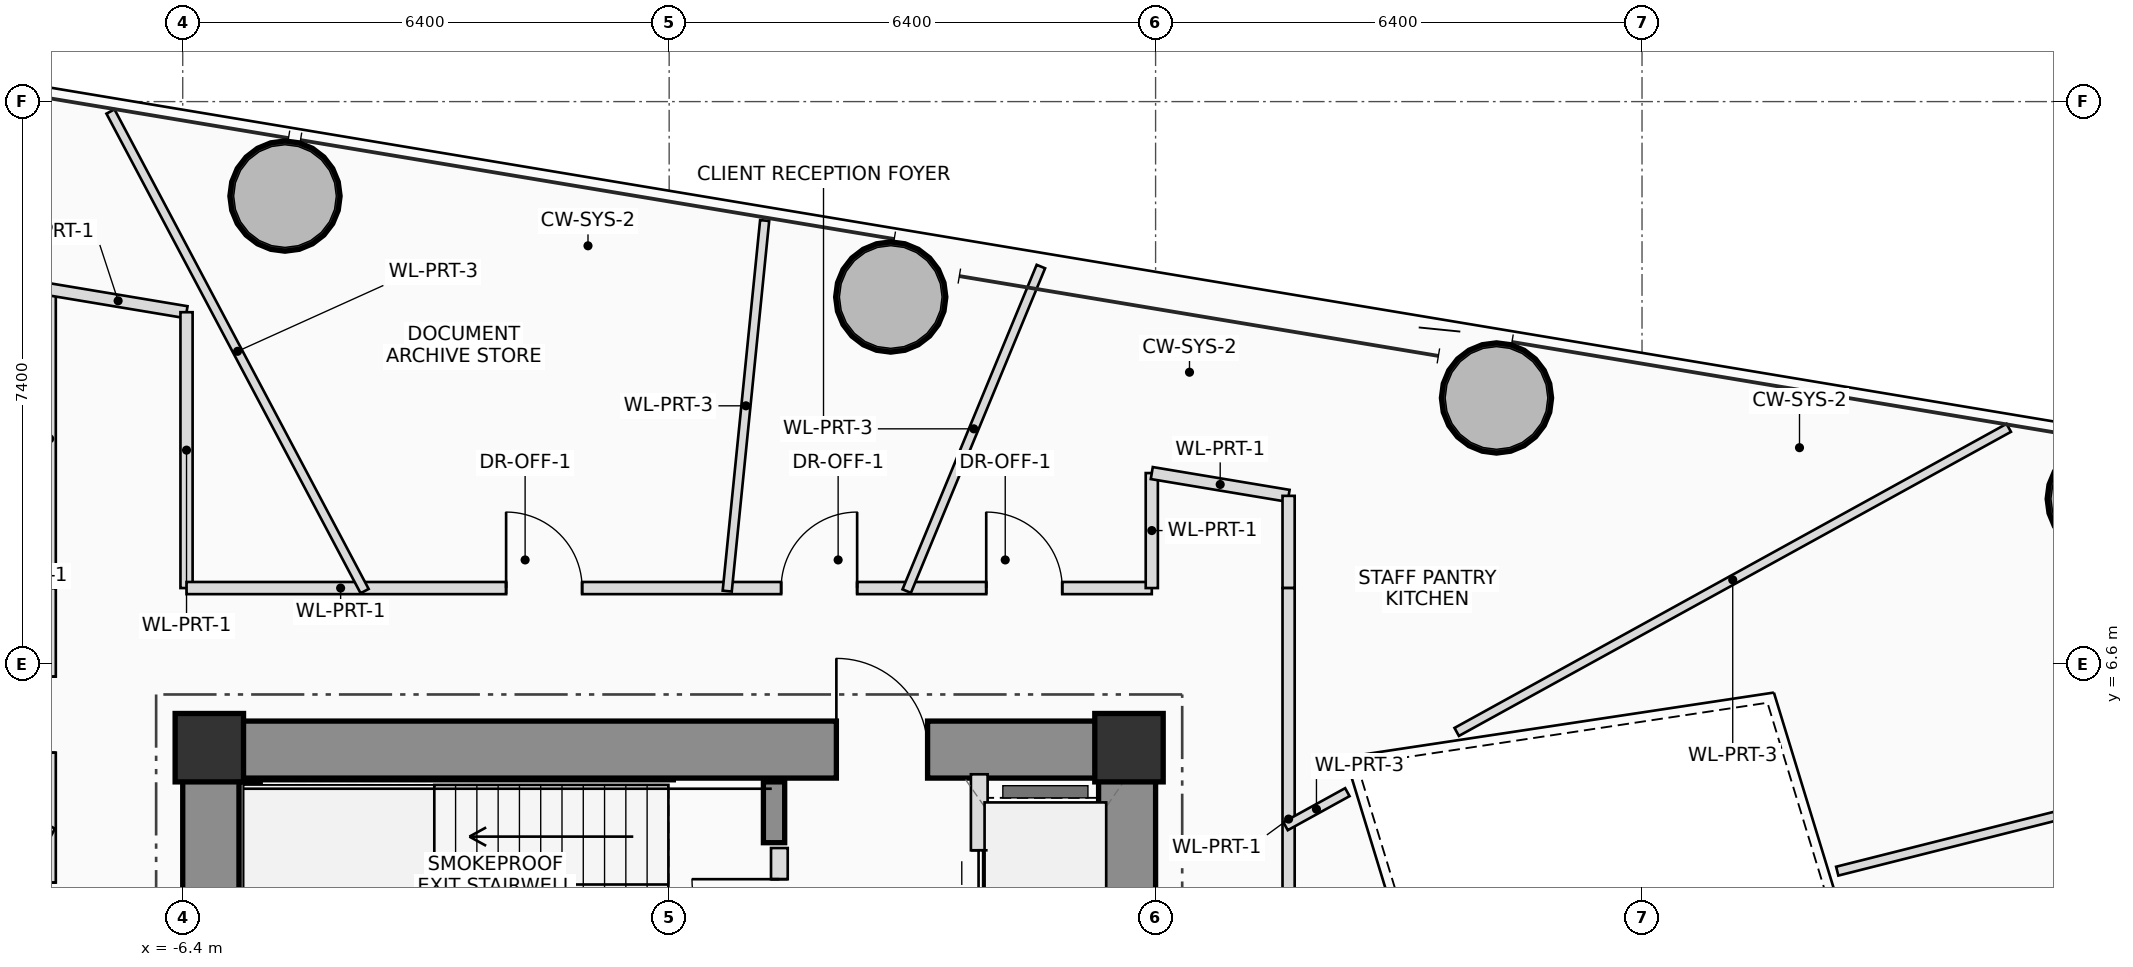
"""IFC4 building model, lengths in metres.
Left out: names, types, materials, properties, quantities, classifications, styles, units other than length and angle.
Written with IfcOpenShell. Run it as: python <this file> out.ifc"""

import sys

from ifc_helpers import new_model, si_unit, direction, frame, frame_2d, origin, origin_2d, place, context, subcontext, project, spatial, rectangle, hollow_circle, extrude, source, transform, mapped, element, fill, save


model = new_model("IFC4")
c1 = context("Model", 3, precision=1e-05, world=origin(), true_north=direction((0.0, 1.0)))
c2 = subcontext(c1, "Body", "Model", "MODEL_VIEW")
j1 = project(units=[si_unit("LENGTHUNIT", "METRE"), si_unit("PLANEANGLEUNIT", "RADIAN")], contexts=[c1])
p1 = place(None, origin())
s1 = spatial("IfcSite", under=j1, at=p1, CompositionType="ELEMENT")
p2 = place(p1, origin())
s2 = spatial("IfcBuilding", under=s1, at=p2, CompositionType="ELEMENT")
p3 = place(p2, frame((0.0, 0.0, 112.4)))
s3 = spatial("IfcBuildingStorey", under=s2, at=p3, CompositionType="ELEMENT", Elevation=112.4)
m1 = source(origin(), c2, "Body", "SweptSolid", [
    extrude(rectangle(XDim=0.9, YDim=0.9, at=origin_2d()), origin(), (0.0, 0.0, 1.0), 3.75),
])
for number, where, z_axis, x_axis in (
    (1, (6.05, 5.5, 0.0), (0.0, 0.0, 1.0), (1.0, 0.0, 0.0)),
    (2, (-6.05, 5.5, 0.0), (0.0, 0.0, 1.0), (1.0, 0.0, 0.0)),
):
    element("IfcColumn", number, at=place(p3, frame(where, z_axis=z_axis, x_axis=x_axis)), inside=s3, PredefinedType="COLUMN", context=c2, shape_type="MappedRepresentation", body=[
        mapped(m1, transform((0.0, 0.0, 0.0), scale=1.0)),
    ])
p4 = place(p3, frame((-6.4, 5.475, 0.0), z_axis=(0.0, 0.0, 1.0), x_axis=(1.0, 0.0, 0.0)))
e3 = element("IfcWall", 3, at=p4, inside=s3, PredefinedType="SHEAR", context=c2, shape_type="SweptSolid", body=[
    extrude(rectangle(XDim=12.8, YDim=0.75, at=frame_2d((6.4, 0.0))), origin(), (0.0, 0.0, 1.0), 3.75),
])
p5 = place(p4, frame((8.6, 0.0, 0.0)))
e4 = element("IfcOpeningElement", 4, at=p5, cuts=e3, PredefinedType="OPENING", context=c2, shape_type="SweptSolid", body=[
    extrude(rectangle(XDim=1.2, YDim=2.2, at=frame_2d((0.6, 1.1))), frame((0.0, 0.385, 0.0), z_axis=(0.0, -1.0, 0.0), x_axis=(1.0, 0.0, 0.0)), (0.0, 0.0, 1.0), 0.77),
])
p6 = place(p3, frame((6.025, -5.1, 0.0), z_axis=(0.0, 0.0, 1.0), x_axis=(0.0, 1.0, 0.0)))
e5 = element("IfcWall", 5, at=p6, inside=s3, PredefinedType="SHEAR", context=c2, shape_type="SweptSolid", body=[
    extrude(rectangle(XDim=10.2, YDim=0.75, at=frame_2d((5.1, 0.0))), origin(), (0.0, 0.0, 1.0), 3.75),
])
p7 = place(p3, frame((-6.025, 1.75, 0.0), z_axis=(0.0, 0.0, 1.0), x_axis=(0.0, 1.0, 0.0)))
e6 = element("IfcWall", 6, at=p7, inside=s3, PredefinedType="SHEAR", context=c2, shape_type="SweptSolid", body=[
    extrude(rectangle(XDim=3.35, YDim=0.75, at=frame_2d((1.675, 0.0))), origin(), (0.0, 0.0, 1.0), 3.75),
])
p8 = place(p3, frame((-5.52, 2.3, 0.0), z_axis=(0.0, 0.0, 1.0), x_axis=(0.0, 1.0, 0.0)))
e7 = element("IfcWall", 7, at=p8, inside=s3, PredefinedType="SHEAR", context=c2, shape_type="SweptSolid", body=[
    extrude(rectangle(XDim=2.75, YDim=0.28, at=frame_2d((1.375, 0.0))), origin(), (0.0, 0.0, 1.0), 3.75),
])
p9 = place(p3, frame((1.38, 4.25, 0.0), z_axis=(0.0, 0.0, 1.0), x_axis=(0.0, 1.0, 0.0)))
e8 = element("IfcWall", 8, at=p9, inside=s3, PredefinedType="SHEAR", context=c2, shape_type="SweptSolid", body=[
    extrude(rectangle(XDim=0.8, YDim=0.28, at=frame_2d((0.4, 0.0))), origin(), (0.0, 0.0, 1.0), 3.75),
])
m2 = source(origin(), c2, "Body", "SweptSolid", [
    extrude(hollow_circle(Radius=0.725, WallThickness=0.05, at=origin_2d()), origin(), (0.0, 0.0, 1.0), 3.75),
])
for number, where, z_axis, x_axis in (
    (9, (18.855, 8.773, 0.0), (0.0, 0.0, 1.0), (1.0, 0.0, 0.0)),
    (10, (10.885, 10.101, 0.0), (0.0, 0.0, 1.0), (1.0, 0.0, 0.0)),
    (11, (2.915, 11.429, 0.0), (0.0, 0.0, 1.0), (1.0, 0.0, 0.0)),
    (12, (-5.054, 12.757, 0.0), (0.0, 0.0, 1.0), (1.0, 0.0, 0.0)),
):
    element("IfcColumn", number, at=place(p3, frame(where, z_axis=z_axis, x_axis=x_axis)), inside=s3, PredefinedType="COLUMN", context=c2, shape_type="MappedRepresentation", body=[
        mapped(m2, transform((0.0, 0.0, 0.0), scale=1.0)),
    ])
p10 = place(p3, frame((1.45, 2.2, 0.0), z_axis=(0.0, 0.0, 1.0), x_axis=(0.0, 1.0, 0.0)))
e13 = element("IfcWall", 13, at=p10, inside=s3, PredefinedType="PLUMBINGWALL", context=c2, shape_type="SweptSolid", body=[
    extrude(rectangle(XDim=1.98, YDim=0.22, at=frame_2d((0.99, 0.0))), origin(), (0.0, 0.0, 1.0), 3.545),
])
p11 = place(p10, frame((0.42, 0.0, 0.0)))
e14 = element("IfcOpeningElement", 14, at=p11, cuts=e13, PredefinedType="OPENING", context=c2, shape_type="SweptSolid", body=[
    extrude(rectangle(XDim=1.15, YDim=2.15, at=frame_2d((0.575, 1.075))), frame((0.0, 0.12, 0.0), z_axis=(0.0, -1.0, 0.0), x_axis=(1.0, 0.0, 0.0)), (0.0, 0.0, 1.0), 0.24),
])
p12 = place(p3, frame((4.08, 2.2, 0.0), z_axis=(0.0, 0.0, 1.0), x_axis=(0.0, 1.0, 0.0)))
e15 = element("IfcWall", 15, at=p12, inside=s3, PredefinedType="PLUMBINGWALL", context=c2, shape_type="SweptSolid", body=[
    extrude(rectangle(XDim=2.95, YDim=0.22, at=frame_2d((1.475, 0.0))), origin(), (0.0, 0.0, 1.0), 3.545),
])
p13 = place(p12, frame((0.75, 0.0, 0.0)))
e16 = element("IfcOpeningElement", 16, at=p13, cuts=e15, PredefinedType="OPENING", context=c2, shape_type="SweptSolid", body=[
    extrude(rectangle(XDim=1.2, YDim=2.25, at=frame_2d((0.6, 1.125))), frame((0.0, 0.12, 0.0), z_axis=(0.0, -1.0, 0.0), x_axis=(1.0, 0.0, 0.0)), (0.0, 0.0, 1.0), 0.24),
])
p14 = place(p3, frame((-8.15, -7.6, 0.0), z_axis=(0.0, 0.0, 1.0), x_axis=(0.0, 1.0, 0.0)))
e17 = element("IfcWall", 17, at=p14, inside=s3, PredefinedType="PARTITIONING", context=c2, shape_type="SweptSolid", body=[
    extrude(rectangle(XDim=15.2, YDim=0.16, at=frame_2d((7.6, 0.0))), origin(), (0.0, 0.0, 1.0), 2.85),
])
p15 = place(p14, frame((2.29, 0.0, 0.0)))
e18 = element("IfcOpeningElement", 18, at=p15, cuts=e17, PredefinedType="OPENING", context=c2, shape_type="SweptSolid", body=[
    extrude(rectangle(XDim=1.0, YDim=2.25, at=frame_2d((0.5, 1.125))), frame((0.0, 0.09, 0.0), z_axis=(0.0, -1.0, 0.0), x_axis=(1.0, 0.0, 0.0)), (0.0, 0.0, 1.0), 0.18),
])
p16 = place(p14, frame((7.0, 0.0, 0.0)))
e19 = element("IfcOpeningElement", 19, at=p16, cuts=e17, PredefinedType="OPENING", context=c2, shape_type="SweptSolid", body=[
    extrude(rectangle(XDim=1.0, YDim=2.25, at=frame_2d((0.5, 1.125))), frame((0.0, 0.09, 0.0), z_axis=(0.0, -1.0, 0.0), x_axis=(1.0, 0.0, 0.0)), (0.0, 0.0, 1.0), 0.18),
])
p17 = place(p14, frame((10.325, 0.0, 0.0)))
e20 = element("IfcOpeningElement", 20, at=p17, cuts=e17, PredefinedType="OPENING", context=c2, shape_type="SweptSolid", body=[
    extrude(rectangle(XDim=1.0, YDim=2.25, at=frame_2d((0.5, 1.125))), frame((0.0, 0.09, 0.0), z_axis=(0.0, -1.0, 0.0), x_axis=(1.0, 0.0, 0.0)), (0.0, 0.0, 1.0), 0.18),
])
p18 = place(p14, frame((13.035, 0.0, 0.0)))
e21 = element("IfcOpeningElement", 21, at=p18, cuts=e17, PredefinedType="OPENING", context=c2, shape_type="SweptSolid", body=[
    extrude(rectangle(XDim=1.0, YDim=2.25, at=frame_2d((0.5, 1.125))), frame((0.0, 0.09, 0.0), z_axis=(0.0, -1.0, 0.0), x_axis=(1.0, 0.0, 0.0)), (0.0, 0.0, 1.0), 0.18),
])
p19 = place(p3, frame((-8.15, 7.6, 0.0), z_axis=(0.0, 0.0, 1.0), x_axis=(0.0, 1.0, 0.0)))
e22 = element("IfcWall", 22, at=p19, inside=s3, PredefinedType="PARTITIONING", context=c2, shape_type="SweptSolid", body=[
    extrude(rectangle(XDim=3.929, YDim=0.16, at=frame_2d((1.964, 0.0))), origin(), (0.0, 0.0, 1.0), 2.85),
])
p20 = place(p3, frame((-8.15, 11.529, 0.0), z_axis=(0.0, 0.0, 1.0), x_axis=(0.986408385389, -0.164312194419, 0.0)))
e23 = element("IfcWall", 23, at=p20, inside=s3, PredefinedType="PARTITIONING", context=c2, shape_type="SweptSolid", body=[
    extrude(rectangle(XDim=1.825, YDim=0.16, at=frame_2d((0.912, 0.0))), origin(), (0.0, 0.0, 1.0), 3.545),
])
p21 = place(p3, frame((-6.35, 11.229, 0.0), z_axis=(0.0, 0.0, 1.0), x_axis=(0.0, -1.0, 0.0)))
e24 = element("IfcWall", 24, at=p21, inside=s3, PredefinedType="PARTITIONING", context=c2, shape_type="SweptSolid", body=[
    extrude(rectangle(XDim=3.629, YDim=0.16, at=frame_2d((1.814, 0.0))), origin(), (0.0, 0.0, 1.0), 3.05),
])
p22 = place(p3, frame((-6.35, 7.6, 0.0), z_axis=(0.0, 0.0, 1.0), x_axis=(1.0, 0.0, 0.0)))
e25 = element("IfcWall", 25, at=p22, inside=s3, PredefinedType="PARTITIONING", context=c2, shape_type="SweptSolid", body=[
    extrude(rectangle(XDim=12.7, YDim=0.16, at=frame_2d((6.35, 0.0))), origin(), (0.0, 0.0, 1.0), 2.85),
])
p23 = place(p22, frame((4.205, 0.0, 0.0)))
e26 = element("IfcOpeningElement", 26, at=p23, cuts=e25, PredefinedType="OPENING", context=c2, shape_type="SweptSolid", body=[
    extrude(rectangle(XDim=1.0, YDim=2.25, at=frame_2d((0.5, 1.125))), frame((0.0, 0.09, 0.0), z_axis=(0.0, -1.0, 0.0), x_axis=(1.0, 0.0, 0.0)), (0.0, 0.0, 1.0), 0.18),
])
p24 = place(p22, frame((7.823, 0.0, 0.0)))
e27 = element("IfcOpeningElement", 27, at=p24, cuts=e25, PredefinedType="OPENING", context=c2, shape_type="SweptSolid", body=[
    extrude(rectangle(XDim=1.0, YDim=2.25, at=frame_2d((0.5, 1.125))), frame((0.0, 0.09, 0.0), z_axis=(0.0, -1.0, 0.0), x_axis=(1.0, 0.0, 0.0)), (0.0, 0.0, 1.0), 0.18),
])
p25 = place(p22, frame((10.522, 0.0, 0.0)))
e28 = element("IfcOpeningElement", 28, at=p25, cuts=e25, PredefinedType="OPENING", context=c2, shape_type="SweptSolid", body=[
    extrude(rectangle(XDim=1.0, YDim=2.25, at=frame_2d((0.5, 1.125))), frame((0.0, 0.09, 0.0), z_axis=(0.0, -1.0, 0.0), x_axis=(1.0, 0.0, 0.0)), (0.0, 0.0, 1.0), 0.18),
])
p26 = place(p3, frame((6.35, 7.6, 0.0), z_axis=(0.0, 0.0, 1.0), x_axis=(0.0, 1.0, 0.0)))
e29 = element("IfcWall", 29, at=p26, inside=s3, PredefinedType="PARTITIONING", context=c2, shape_type="SweptSolid", body=[
    extrude(rectangle(XDim=1.513, YDim=0.16, at=frame_2d((0.756, 0.0))), origin(), (0.0, 0.0, 1.0), 3.05),
])
p27 = place(p3, frame((6.35, 9.113, 0.0), z_axis=(0.0, 0.0, 1.0), x_axis=(0.986386690349, -0.164442382317, 0.0)))
e30 = element("IfcWall", 30, at=p27, inside=s3, PredefinedType="PARTITIONING", context=c2, shape_type="SweptSolid", body=[
    extrude(rectangle(XDim=1.825, YDim=0.16, at=frame_2d((0.912, 0.0))), origin(), (0.0, 0.0, 1.0), 3.2),
])
p28 = place(p3, frame((8.15, 8.813, 0.0), z_axis=(0.0, 0.0, 1.0), x_axis=(0.0, -1.0, 0.0)))
e31 = element("IfcWall", 31, at=p28, inside=s3, PredefinedType="PARTITIONING", context=c2, shape_type="SweptSolid", body=[
    extrude(rectangle(XDim=1.213, YDim=0.16, at=frame_2d((0.606, 0.0))), origin(), (0.0, 0.0, 1.0), 2.85),
])
p29 = place(p3, frame((8.15, 7.6, 0.0), z_axis=(0.0, 0.0, 1.0), x_axis=(0.0, -1.0, 0.0)))
e32 = element("IfcWall", 32, at=p29, inside=s3, PredefinedType="PARTITIONING", context=c2, shape_type="SweptSolid", body=[
    extrude(rectangle(XDim=7.58, YDim=0.16, at=frame_2d((3.79, 0.0))), origin(), (0.0, 0.0, 1.0), 2.85),
])
p30 = place(p29, frame((6.229, 0.0, 0.0)))
e33 = element("IfcOpeningElement", 33, at=p30, cuts=e32, PredefinedType="OPENING", context=c2, shape_type="SweptSolid", body=[
    extrude(rectangle(XDim=1.0, YDim=2.25, at=frame_2d((0.5, 1.125))), frame((0.0, 0.09, 0.0), z_axis=(0.0, -1.0, 0.0), x_axis=(1.0, 0.0, 0.0)), (0.0, 0.0, 1.0), 0.18),
])
p31 = place(p3, frame((15.368, 3.875, 0.0), z_axis=(0.0, 0.0, 1.0), x_axis=(0.969639714565, 0.244537980563, 0.0)))
e34 = element("IfcWall", 34, at=p31, inside=s3, PredefinedType="PARTITIONING", context=c2, shape_type="SweptSolid", body=[
    extrude(rectangle(XDim=8.117, YDim=0.12, at=frame_2d((4.058, 0.0))), origin(), (0.0, 0.0, 1.0), 3.01),
])
p32 = place(p3, frame((8.11, 4.467, 0.0), z_axis=(0.0, 0.0, 1.0), x_axis=(0.875876836962, 0.482534730847, 0.0)))
e35 = element("IfcWall", 35, at=p32, inside=s3, PredefinedType="PARTITIONING", context=c2, shape_type="SweptSolid", body=[
    extrude(rectangle(XDim=0.928, YDim=0.12, at=frame_2d((0.464, 0.0))), origin(), (0.0, 0.0, 1.0), 3.21),
])
p33 = place(p3, frame((10.362, 5.707, 0.0), z_axis=(0.0, 0.0, 1.0), x_axis=(0.875911137712, 0.482472464326, 0.0)))
e36 = element("IfcWall", 36, at=p33, inside=s3, PredefinedType="PARTITIONING", context=c2, shape_type="SweptSolid", body=[
    extrude(rectangle(XDim=8.292, YDim=0.12, at=frame_2d((4.146, 0.0))), origin(), (0.0, 0.0, 1.0), 2.85),
])
p34 = place(p3, frame((3.125, 7.56, 0.0), z_axis=(0.0, 0.0, 1.0), x_axis=(0.382088862778, 0.924125587212, 0.0)))
e37 = element("IfcWall", 37, at=p34, inside=s3, PredefinedType="PARTITIONING", context=c2, shape_type="SweptSolid", body=[
    extrude(rectangle(XDim=4.62, YDim=0.12, at=frame_2d((2.31, 0.0))), origin(), (0.0, 0.0, 1.0), 2.85),
])
p35 = place(p3, frame((0.764, 7.56, 0.0), z_axis=(0.0, 0.0, 1.0), x_axis=(0.100495218626, 0.994937541272, 0.0)))
e38 = element("IfcWall", 38, at=p35, inside=s3, PredefinedType="PARTITIONING", context=c2, shape_type="SweptSolid", body=[
    extrude(rectangle(XDim=4.9, YDim=0.12, at=frame_2d((2.45, 0.0))), origin(), (0.0, 0.0, 1.0), 3.01),
])
p36 = place(p3, frame((-4.007, 7.56, 0.0), z_axis=(0.0, 0.0, 1.0), x_axis=(-0.468285095747, 0.883577426772, 0.0)))
e39 = element("IfcWall", 39, at=p36, inside=s3, PredefinedType="PARTITIONING", context=c2, shape_type="SweptSolid", body=[
    extrude(rectangle(XDim=7.141, YDim=0.12, at=frame_2d((3.57, 0.0))), origin(), (0.0, 0.0, 1.0), 2.85),
])
p37 = place(p3, frame((-8.11, 4.382, 0.0), z_axis=(0.0, 0.0, 1.0), x_axis=(-0.879765097161, 0.47540863877, 0.0)))
e40 = element("IfcWall", 40, at=p37, inside=s3, PredefinedType="PARTITIONING", context=c2, shape_type="SweptSolid", body=[
    extrude(rectangle(XDim=10.741, YDim=0.12, at=frame_2d((5.371, 0.0))), origin(), (0.0, 0.0, 1.0), 2.85),
])
p38 = place(p3, frame((-8.11, 1.976, 0.0), z_axis=(0.0, 0.0, 1.0), x_axis=(-0.971576662732, 0.236725132665, 0.0)))
e41 = element("IfcWall", 41, at=p38, inside=s3, PredefinedType="PARTITIONING", context=c2, shape_type="SweptSolid", body=[
    extrude(rectangle(XDim=7.955, YDim=0.12, at=frame_2d((3.977, 0.0))), origin(), (0.0, 0.0, 1.0), 2.85),
])
p39 = place(p5, origin())
e42 = element("IfcDoor", 42, at=p39, inside=s3, OperationType="SINGLE_SWING_LEFT", PredefinedType="DOOR", context=c2, shape_type="SweptSolid", body=[
    extrude(rectangle(XDim=1.2, YDim=2.2, at=frame_2d((0.6, 1.1))), frame((0.0, 0.025, 0.0), z_axis=(0.0, -1.0, 0.0), x_axis=(1.0, 0.0, 0.0)), (0.0, 0.0, 1.0), 0.05),
])
fill(e4, e42)
p40 = place(p11, origin())
e43 = element("IfcDoor", 43, at=p40, inside=s3, OperationType="SINGLE_SWING_RIGHT", PredefinedType="DOOR", context=c2, shape_type="SweptSolid", body=[
    extrude(rectangle(XDim=1.15, YDim=2.15, at=frame_2d((0.575, 1.075))), frame((0.0, 0.025, 0.0), z_axis=(0.0, -1.0, 0.0), x_axis=(1.0, 0.0, 0.0)), (0.0, 0.0, 1.0), 0.05),
])
fill(e14, e43)
p41 = place(p13, origin())
e44 = element("IfcDoor", 44, at=p41, inside=s3, OperationType="DOUBLE_DOOR_SLIDING", PredefinedType="DOOR", context=c2, shape_type="SweptSolid", body=[
    extrude(rectangle(XDim=1.2, YDim=2.25, at=frame_2d((0.6, 1.125))), frame((0.0, 0.025, 0.0), z_axis=(0.0, -1.0, 0.0), x_axis=(1.0, 0.0, 0.0)), (0.0, 0.0, 1.0), 0.05),
])
fill(e16, e44)
p42 = place(p23, origin())
e45 = element("IfcDoor", 45, at=p42, inside=s3, OperationType="SINGLE_SWING_LEFT", PredefinedType="DOOR", context=c2, shape_type="SweptSolid", body=[
    extrude(rectangle(XDim=1.0, YDim=2.25, at=frame_2d((0.5, 1.125))), frame((0.0, 0.025, 0.0), z_axis=(0.0, -1.0, 0.0), x_axis=(1.0, 0.0, 0.0)), (0.0, 0.0, 1.0), 0.05),
])
fill(e26, e45)
p43 = place(p24, origin())
e46 = element("IfcDoor", 46, at=p43, inside=s3, OperationType="SINGLE_SWING_RIGHT", PredefinedType="DOOR", context=c2, shape_type="SweptSolid", body=[
    extrude(rectangle(XDim=1.0, YDim=2.25, at=frame_2d((0.5, 1.125))), frame((0.0, 0.025, 0.0), z_axis=(0.0, -1.0, 0.0), x_axis=(1.0, 0.0, 0.0)), (0.0, 0.0, 1.0), 0.05),
])
fill(e27, e46)
p44 = place(p25, origin())
e47 = element("IfcDoor", 47, at=p44, inside=s3, OperationType="SINGLE_SWING_LEFT", PredefinedType="DOOR", context=c2, shape_type="SweptSolid", body=[
    extrude(rectangle(XDim=1.0, YDim=2.25, at=frame_2d((0.5, 1.125))), frame((0.0, 0.025, 0.0), z_axis=(0.0, -1.0, 0.0), x_axis=(1.0, 0.0, 0.0)), (0.0, 0.0, 1.0), 0.05),
])
fill(e28, e47)
save(model, sys.argv[1])
